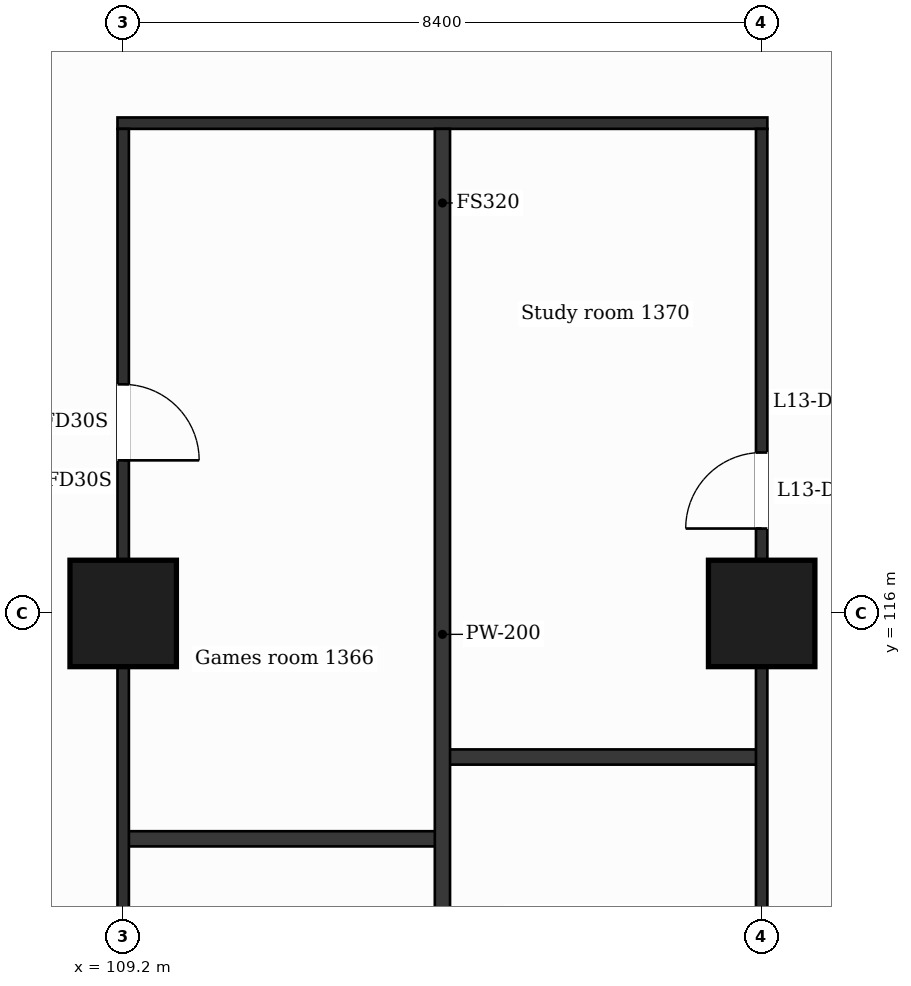
"""IFC4 building model, lengths in metres.
Left out: names, types, materials, properties, quantities, classifications, styles, units other than length and angle.
Written with IfcOpenShell. Run it as: python <this file> out.ifc"""

import sys

from ifc_helpers import new_model, si_unit, direction, frame, frame_2d, origin, origin_2d, place, context, subcontext, project, spatial, rectangle, extrude, element, fill, save


model = new_model("IFC4")
c1 = context("Model", 3, precision=1e-05, world=origin(), true_north=direction((0.0, 1.0)))
c2 = subcontext(c1, "Body", "Model", "MODEL_VIEW")
j1 = project(units=[si_unit("LENGTHUNIT", "METRE"), si_unit("PLANEANGLEUNIT", "RADIAN")], contexts=[c1])
p1 = place(None, origin())
s1 = spatial("IfcSite", under=j1, at=p1, CompositionType="ELEMENT")
p2 = place(p1, origin())
s2 = spatial("IfcBuilding", under=s1, at=p2, CompositionType="ELEMENT")
p3 = place(p2, frame((0.0, 0.0, 63.5)))
s3 = spatial("IfcBuildingStorey", under=s2, at=p3, CompositionType="ELEMENT", Elevation=63.5)
for number, where, z_axis, x_axis in (
    (1, (109.2, 116.0, 0.0), (0.0, 0.0, 1.0), (1.0, 0.0, 0.0)),
    (2, (117.6, 116.0, 0.0), (0.0, 0.0, 1.0), (1.0, 0.0, 0.0)),
):
    element("IfcColumn", number, at=place(p3, frame(where, z_axis=z_axis, x_axis=x_axis)), inside=s3, PredefinedType="COLUMN", context=c2, shape_type="SweptSolid", body=[
        extrude(rectangle(XDim=1.4, YDim=1.4, at=origin_2d()), origin(), (0.0, 0.0, 1.0), 3.5),
    ])
p4 = place(p3, frame((109.2, 113.035, 0.0), z_axis=(0.0, 0.0, 1.0), x_axis=(1.0, 0.0, 0.0)))
e3 = element("IfcWall", 3, at=p4, inside=s3, PredefinedType="PARTITIONING", context=c2, shape_type="SweptSolid", body=[
    extrude(rectangle(XDim=4.2, YDim=0.2, at=frame_2d((2.1, 0.0))), origin(), (0.0, 0.0, 1.0), 3.18),
])
p5 = place(p3, frame((113.4, 114.111, 0.0), z_axis=(0.0, 0.0, 1.0), x_axis=(1.0, 0.0, 0.0)))
e4 = element("IfcWall", 4, at=p5, inside=s3, PredefinedType="PARTITIONING", context=c2, shape_type="SweptSolid", body=[
    extrude(rectangle(XDim=4.2, YDim=0.2, at=frame_2d((2.1, 0.0))), origin(), (0.0, 0.0, 1.0), 3.18),
])
p6 = place(p3, frame((109.125, 122.45, 0.0), z_axis=(0.0, 0.0, 1.0), x_axis=(1.0, 0.0, 0.0)))
e5 = element("IfcWall", 5, at=p6, inside=s3, PredefinedType="PARTITIONING", context=c2, shape_type="SweptSolid", body=[
    extrude(rectangle(XDim=8.55, YDim=0.15, at=frame_2d((4.275, 0.0))), origin(), (0.0, 0.0, 1.0), 3.18),
])
p7 = place(p3, frame((109.2, 109.075, 0.0), z_axis=(0.0, 0.0, 1.0), x_axis=(0.0, 1.0, 0.0)))
e6 = element("IfcWall", 6, at=p7, inside=s3, PredefinedType="PARTITIONING", context=c2, shape_type="SweptSolid", body=[
    extrude(rectangle(XDim=13.3, YDim=0.15, at=frame_2d((6.65, 0.0))), origin(), (0.0, 0.0, 1.0), 3.18),
])
p8 = place(p7, frame((8.939, 0.0, 0.0)))
e7 = element("IfcOpeningElement", 7, at=p8, cuts=e6, PredefinedType="OPENING", context=c2, shape_type="SweptSolid", body=[
    extrude(rectangle(XDim=1.0, YDim=2.1, at=frame_2d((0.5, 1.05))), frame((0.0, 0.085, 0.0), z_axis=(0.0, -1.0, 0.0), x_axis=(1.0, 0.0, 0.0)), (0.0, 0.0, 1.0), 0.17),
])
p9 = place(p3, frame((113.4, 109.075, 0.0), z_axis=(0.0, 0.0, 1.0), x_axis=(0.0, 1.0, 0.0)))
e8 = element("IfcWall", 8, at=p9, inside=s3, PredefinedType="PARTITIONING", context=c2, shape_type="SweptSolid", body=[
    extrude(rectangle(XDim=13.3, YDim=0.2, at=frame_2d((6.65, 0.0))), origin(), (0.0, 0.0, 1.0), 3.18),
])
p10 = place(p3, frame((117.6, 109.075, 0.0), z_axis=(0.0, 0.0, 1.0), x_axis=(0.0, 1.0, 0.0)))
e9 = element("IfcWall", 9, at=p10, inside=s3, PredefinedType="PARTITIONING", context=c2, shape_type="SweptSolid", body=[
    extrude(rectangle(XDim=13.3, YDim=0.15, at=frame_2d((6.65, 0.0))), origin(), (0.0, 0.0, 1.0), 3.18),
])
p11 = place(p10, frame((8.042, 0.0, 0.0)))
e10 = element("IfcOpeningElement", 10, at=p11, cuts=e9, PredefinedType="OPENING", context=c2, shape_type="SweptSolid", body=[
    extrude(rectangle(XDim=1.0, YDim=2.1, at=frame_2d((0.5, 1.05))), frame((0.0, 0.085, 0.0), z_axis=(0.0, -1.0, 0.0), x_axis=(1.0, 0.0, 0.0)), (0.0, 0.0, 1.0), 0.17),
])
p12 = place(p8, origin())
e11 = element("IfcDoor", 11, at=p12, inside=s3, OperationType="SINGLE_SWING_LEFT", PredefinedType="DOOR", context=c2, shape_type="SweptSolid", body=[
    extrude(rectangle(XDim=1.0, YDim=2.1, at=frame_2d((0.5, 1.05))), frame((0.0, 0.025, 0.0), z_axis=(0.0, -1.0, 0.0), x_axis=(1.0, 0.0, 0.0)), (0.0, 0.0, 1.0), 0.05),
])
fill(e7, e11)
p13 = place(p11, origin())
e12 = element("IfcDoor", 12, at=p13, inside=s3, OperationType="SINGLE_SWING_LEFT", PredefinedType="DOOR", context=c2, shape_type="SweptSolid", body=[
    extrude(rectangle(XDim=1.0, YDim=2.1, at=frame_2d((0.5, 1.05))), frame((0.0, 0.025, 0.0), z_axis=(0.0, -1.0, 0.0), x_axis=(1.0, 0.0, 0.0)), (0.0, 0.0, 1.0), 0.05),
])
fill(e10, e12)
save(model, sys.argv[1])
